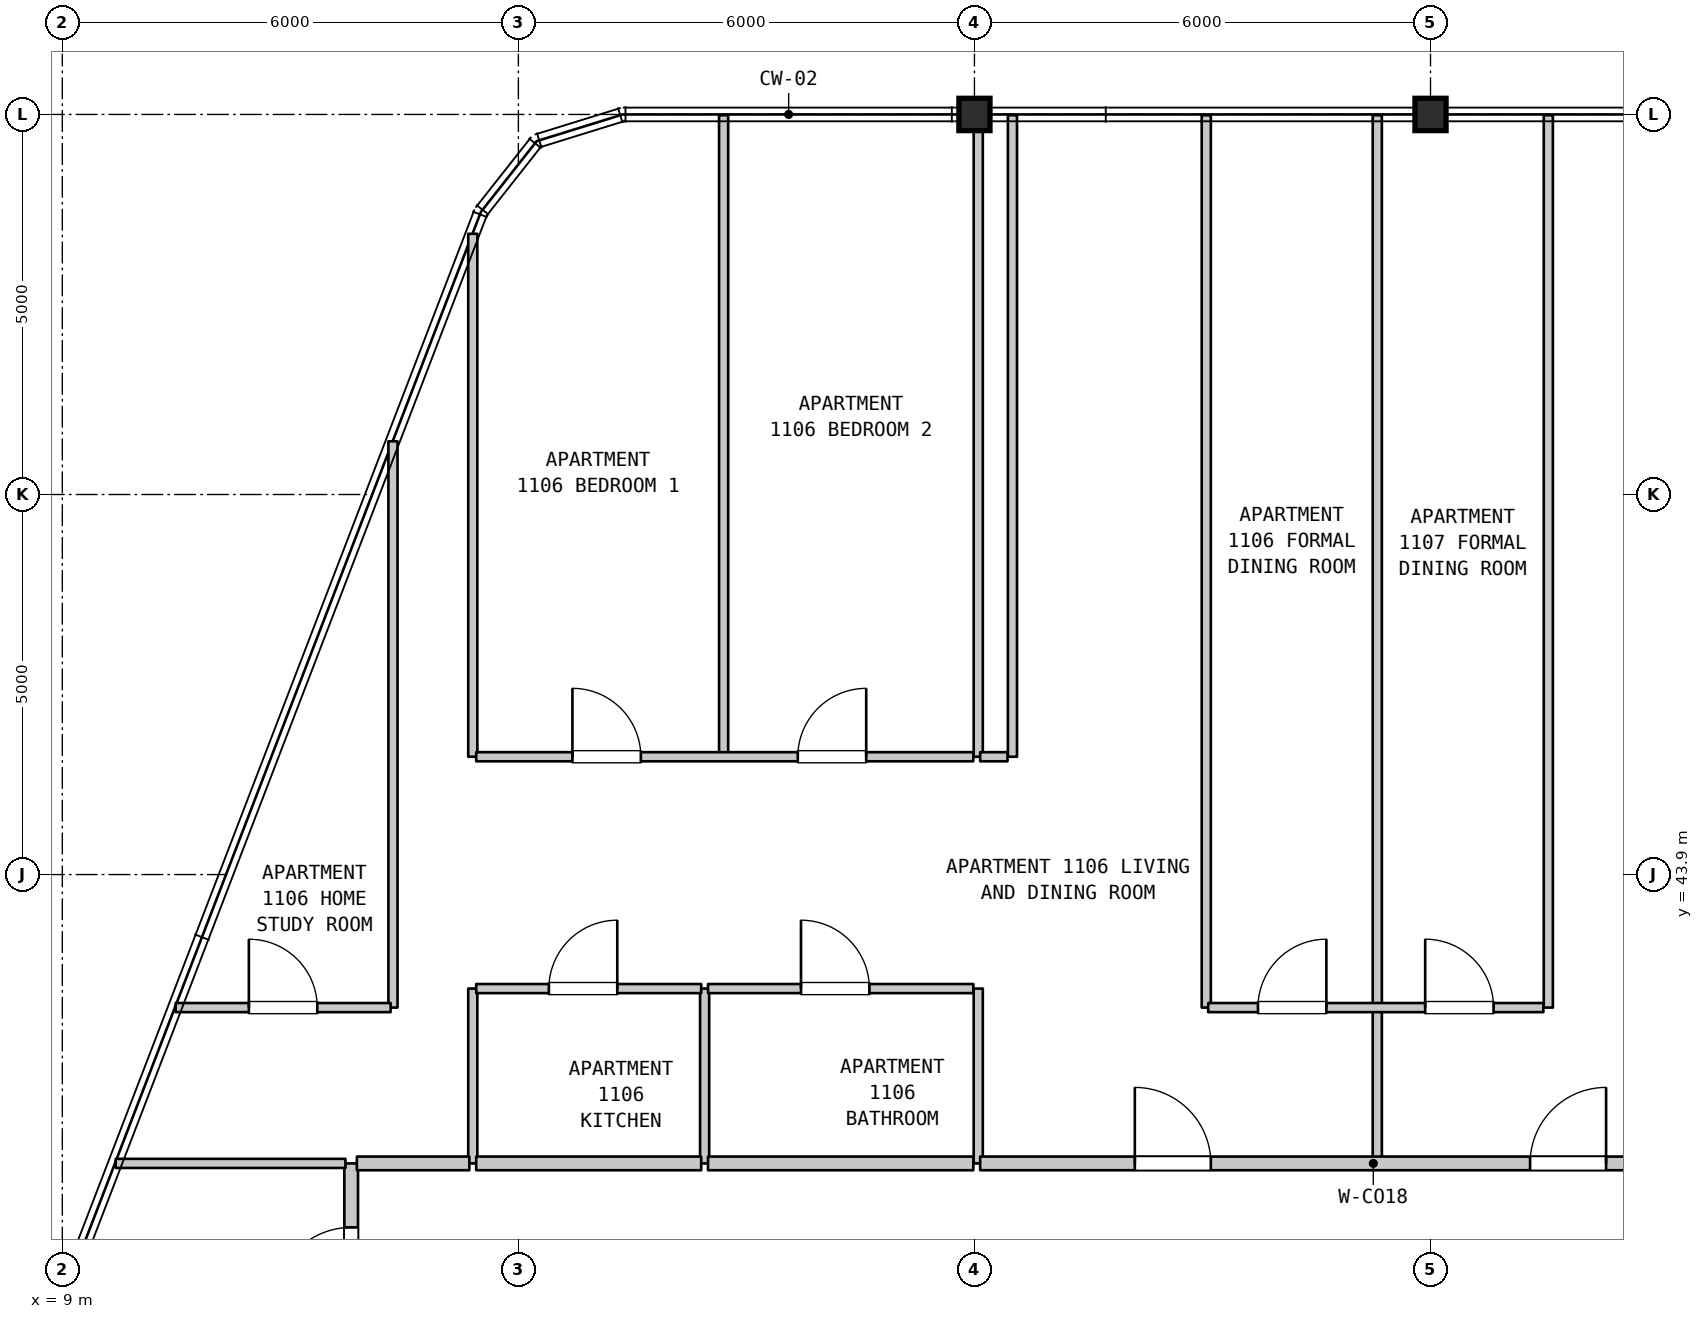
"""IFC4 building model, lengths in metres.
Left out: names, types, materials, properties, quantities, classifications, styles, units other than length and angle.
Written with IfcOpenShell. Run it as: python <this file> out.ifc"""

import sys

from ifc_helpers import new_model, si_unit, direction, frame, frame_2d, origin, origin_2d, place, context, subcontext, project, spatial, rectangle, i_section, extrude, element, fill, save


model = new_model("IFC4")
c1 = context("Model", 3, precision=1e-05, world=origin(), true_north=direction((0.0, 1.0)))
c2 = subcontext(c1, "Body", "Model", "MODEL_VIEW")
j1 = project(units=[si_unit("LENGTHUNIT", "METRE"), si_unit("PLANEANGLEUNIT", "RADIAN")], contexts=[c1])
p1 = place(None, origin())
s1 = spatial("IfcSite", under=j1, at=p1, CompositionType="ELEMENT")
p2 = place(p1, origin())
s2 = spatial("IfcBuilding", under=s1, at=p2, CompositionType="ELEMENT")
p3 = place(p2, frame((0.0, 0.0, 49.9)))
s3 = spatial("IfcBuildingStorey", under=s2, at=p3, CompositionType="ELEMENT", Elevation=49.9)
for number, where, z_axis, x_axis in (
    (1, (21.0, 53.9, 0.0), (0.0, 0.0, 1.0), (1.0, 0.0, 0.0)),
    (2, (27.0, 53.9, 0.0), (0.0, 0.0, 1.0), (1.0, 0.0, 0.0)),
):
    element("IfcColumn", number, at=place(p3, frame(where, z_axis=z_axis, x_axis=x_axis)), inside=s3, PredefinedType="COLUMN", context=c2, shape_type="SweptSolid", body=[
        extrude(i_section(OverallWidth=0.409, OverallDepth=0.425, WebThickness=0.032, FlangeThickness=0.052, FilletRadius=0.015, at=origin_2d()), origin(), (0.0, 0.0, 1.0), 3.7),
    ])
p4 = place(p3, frame((12.8, 37.416, 0.0), z_axis=(0.0, 0.0, 1.0), x_axis=(0.0, 1.0, 0.0)))
e3 = element("IfcWall", 3, at=p4, inside=s3, PredefinedType="STANDARD", context=c2, shape_type="SweptSolid", body=[
    extrude(rectangle(XDim=2.684, YDim=0.18, at=frame_2d((1.342, 0.0))), origin(), (0.0, 0.0, 1.0), 3.385),
])
p5 = place(p4, frame((0.842, 0.0, 0.0)))
e4 = element("IfcOpeningElement", 4, at=p5, cuts=e3, PredefinedType="OPENING", context=c2, shape_type="SweptSolid", body=[
    extrude(rectangle(XDim=1.0, YDim=2.15, at=frame_2d((0.5, 1.075))), frame((0.0, 0.1, 0.0), z_axis=(0.0, -1.0, 0.0), x_axis=(1.0, 0.0, 0.0)), (0.0, 0.0, 1.0), 0.2),
])
p6 = place(p3, frame((13.35, 42.15, 0.0), z_axis=(0.0, 0.0, 1.0), x_axis=(0.0, 1.0, 0.0)))
e5 = element("IfcWall", 5, at=p6, inside=s3, PredefinedType="PARTITIONING", context=c2, shape_type="SweptSolid", body=[
    extrude(rectangle(XDim=7.45, YDim=0.12, at=frame_2d((3.725, 0.0))), origin(), (0.0, 0.0, 1.0), 3.385),
])
p7 = place(p3, frame((14.4, 40.1, 0.0), z_axis=(0.0, 0.0, 1.0), x_axis=(0.0, 1.0, 0.0)))
e6 = element("IfcWall", 6, at=p7, inside=s3, PredefinedType="PARTITIONING", context=c2, shape_type="SweptSolid", body=[
    extrude(rectangle(XDim=2.3, YDim=0.12, at=frame_2d((1.15, 0.0))), origin(), (0.0, 0.0, 1.0), 3.385),
])
p8 = place(p3, frame((14.4, 45.45, 0.0), z_axis=(0.0, 0.0, 1.0), x_axis=(0.0, 1.0, 0.0)))
e7 = element("IfcWall", 7, at=p8, inside=s3, PredefinedType="PARTITIONING", context=c2, shape_type="SweptSolid", body=[
    extrude(rectangle(XDim=6.88, YDim=0.12, at=frame_2d((3.44, 0.0))), origin(), (0.0, 0.0, 1.0), 3.385),
])
p9 = place(p3, frame((17.45, 40.1, 0.0), z_axis=(0.0, 0.0, 1.0), x_axis=(0.0, 1.0, 0.0)))
e8 = element("IfcWall", 8, at=p9, inside=s3, PredefinedType="PARTITIONING", context=c2, shape_type="SweptSolid", body=[
    extrude(rectangle(XDim=2.3, YDim=0.12, at=frame_2d((1.15, 0.0))), origin(), (0.0, 0.0, 1.0), 3.385),
])
p10 = place(p3, frame((17.7, 45.45, 0.0), z_axis=(0.0, 0.0, 1.0), x_axis=(0.0, 1.0, 0.0)))
e9 = element("IfcWall", 9, at=p10, inside=s3, PredefinedType="PARTITIONING", context=c2, shape_type="SweptSolid", body=[
    extrude(rectangle(XDim=8.44, YDim=0.12, at=frame_2d((4.22, 0.0))), origin(), (0.0, 0.0, 1.0), 3.385),
])
p11 = place(p3, frame((21.05, 40.1, 0.0), z_axis=(0.0, 0.0, 1.0), x_axis=(0.0, 1.0, 0.0)))
e10 = element("IfcWall", 10, at=p11, inside=s3, PredefinedType="PARTITIONING", context=c2, shape_type="SweptSolid", body=[
    extrude(rectangle(XDim=2.3, YDim=0.12, at=frame_2d((1.15, 0.0))), origin(), (0.0, 0.0, 1.0), 3.025),
])
p12 = place(p3, frame((21.05, 45.45, 0.0), z_axis=(0.0, 0.0, 1.0), x_axis=(0.0, 1.0, 0.0)))
e11 = element("IfcWall", 11, at=p12, inside=s3, PredefinedType="PARTITIONING", context=c2, shape_type="SweptSolid", body=[
    extrude(rectangle(XDim=8.44, YDim=0.12, at=frame_2d((4.22, 0.0))), origin(), (0.0, 0.0, 1.0), 3.025),
])
p13 = place(p3, frame((21.5, 45.45, 0.0), z_axis=(0.0, 0.0, 1.0), x_axis=(0.0, 1.0, 0.0)))
e12 = element("IfcWall", 12, at=p13, inside=s3, PredefinedType="PARTITIONING", context=c2, shape_type="SweptSolid", body=[
    extrude(rectangle(XDim=8.44, YDim=0.12, at=frame_2d((4.22, 0.0))), origin(), (0.0, 0.0, 1.0), 3.385),
])
p14 = place(p3, frame((24.05, 42.15, 0.0), z_axis=(0.0, 0.0, 1.0), x_axis=(0.0, 1.0, 0.0)))
e13 = element("IfcWall", 13, at=p14, inside=s3, PredefinedType="PARTITIONING", context=c2, shape_type="SweptSolid", body=[
    extrude(rectangle(XDim=11.74, YDim=0.12, at=frame_2d((5.87, 0.0))), origin(), (0.0, 0.0, 1.0), 3.385),
])
p15 = place(p3, frame((26.3, 40.1, 0.0), z_axis=(0.0, 0.0, 1.0), x_axis=(0.0, 1.0, 0.0)))
e14 = element("IfcWall", 14, at=p15, inside=s3, PredefinedType="PARTITIONING", context=c2, shape_type="SweptSolid", body=[
    extrude(rectangle(XDim=2.05, YDim=0.12, at=frame_2d((1.025, 0.0))), origin(), (0.0, 0.0, 1.0), 3.385),
])
for number, where, z_axis, x_axis in (
    (15, (26.3, 42.15, 0.0), (0.0, 0.0, 1.0), (0.0, 1.0, 0.0)),
    (16, (28.55, 42.15, 0.0), (0.0, 0.0, 1.0), (0.0, 1.0, 0.0)),
):
    element("IfcWall", number, at=place(p3, frame(where, z_axis=z_axis, x_axis=x_axis)), inside=s3, PredefinedType="PARTITIONING", context=c2, shape_type="SweptSolid", body=[
        extrude(rectangle(XDim=11.74, YDim=0.12, at=frame_2d((5.87, 0.0))), origin(), (0.0, 0.0, 1.0), 3.385),
    ])
p16 = place(p3, frame((9.702, 40.1, 0.0), z_axis=(0.0, 0.0, 1.0), x_axis=(1.0, 0.0, 0.0)))
e17 = element("IfcWall", 17, at=p16, inside=s3, PredefinedType="PARTITIONING", context=c2, shape_type="SweptSolid", body=[
    extrude(rectangle(XDim=3.023, YDim=0.12, at=frame_2d((1.512, 0.0))), origin(), (0.0, 0.0, 1.0), 3.385),
])
p17 = place(p3, frame((12.875, 40.1, 0.0), z_axis=(0.0, 0.0, 1.0), x_axis=(1.0, 0.0, 0.0)))
e18 = element("IfcWall", 18, at=p17, inside=s3, PredefinedType="STANDARD", context=c2, shape_type="SweptSolid", body=[
    extrude(rectangle(XDim=1.48, YDim=0.18, at=frame_2d((0.74, 0.0))), origin(), (0.0, 0.0, 1.0), 3.385),
])
p18 = place(p3, frame((14.445, 40.1, 0.0), z_axis=(0.0, 0.0, 1.0), x_axis=(1.0, 0.0, 0.0)))
e19 = element("IfcWall", 19, at=p18, inside=s3, PredefinedType="STANDARD", context=c2, shape_type="SweptSolid", body=[
    extrude(rectangle(XDim=2.96, YDim=0.18, at=frame_2d((1.48, 0.0))), origin(), (0.0, 0.0, 1.0), 3.385),
])
p19 = place(p3, frame((17.495, 40.1, 0.0), z_axis=(0.0, 0.0, 1.0), x_axis=(1.0, 0.0, 0.0)))
e20 = element("IfcWall", 20, at=p19, inside=s3, PredefinedType="STANDARD", context=c2, shape_type="SweptSolid", body=[
    extrude(rectangle(XDim=3.49, YDim=0.18, at=frame_2d((1.745, 0.0))), origin(), (0.0, 0.0, 1.0), 3.385),
])
p20 = place(p3, frame((21.075, 40.1, 0.0), z_axis=(0.0, 0.0, 1.0), x_axis=(1.0, 0.0, 0.0)))
e21 = element("IfcWall", 21, at=p20, inside=s3, PredefinedType="STANDARD", context=c2, shape_type="SweptSolid", body=[
    extrude(rectangle(XDim=10.345, YDim=0.18, at=frame_2d((5.172, 0.0))), origin(), (0.0, 0.0, 1.0), 3.385),
])
p21 = place(p20, frame((2.035, 0.0, 0.0)))
e22 = element("IfcOpeningElement", 22, at=p21, cuts=e21, PredefinedType="OPENING", context=c2, shape_type="SweptSolid", body=[
    extrude(rectangle(XDim=1.0, YDim=2.15, at=frame_2d((0.5, 1.075))), frame((0.0, 0.1, 0.0), z_axis=(0.0, -1.0, 0.0), x_axis=(1.0, 0.0, 0.0)), (0.0, 0.0, 1.0), 0.2),
])
p22 = place(p20, frame((7.235, 0.0, 0.0)))
e23 = element("IfcOpeningElement", 23, at=p22, cuts=e21, PredefinedType="OPENING", context=c2, shape_type="SweptSolid", body=[
    extrude(rectangle(XDim=1.0, YDim=2.15, at=frame_2d((0.5, 1.075))), frame((0.0, 0.1, 0.0), z_axis=(0.0, -1.0, 0.0), x_axis=(1.0, 0.0, 0.0)), (0.0, 0.0, 1.0), 0.2),
])
p23 = place(p3, frame((10.491, 42.15, 0.0), z_axis=(0.0, 0.0, 1.0), x_axis=(1.0, 0.0, 0.0)))
e24 = element("IfcWall", 24, at=p23, inside=s3, PredefinedType="PARTITIONING", context=c2, shape_type="SweptSolid", body=[
    extrude(rectangle(XDim=2.828, YDim=0.12, at=frame_2d((1.414, 0.0))), origin(), (0.0, 0.0, 1.0), 3.385),
])
p24 = place(p23, frame((0.963, 0.0, 0.0)))
e25 = element("IfcOpeningElement", 25, at=p24, cuts=e24, PredefinedType="OPENING", context=c2, shape_type="SweptSolid", body=[
    extrude(rectangle(XDim=0.9, YDim=2.15, at=frame_2d((0.45, 1.075))), frame((0.0, 0.07, 0.0), z_axis=(0.0, -1.0, 0.0), x_axis=(1.0, 0.0, 0.0)), (0.0, 0.0, 1.0), 0.14),
])
p25 = place(p3, frame((24.075, 42.15, 0.0), z_axis=(0.0, 0.0, 1.0), x_axis=(1.0, 0.0, 0.0)))
e26 = element("IfcWall", 26, at=p25, inside=s3, PredefinedType="PARTITIONING", context=c2, shape_type="SweptSolid", body=[
    extrude(rectangle(XDim=4.41, YDim=0.12, at=frame_2d((2.205, 0.0))), origin(), (0.0, 0.0, 1.0), 3.385),
])
p26 = place(p25, frame((0.655, 0.0, 0.0)))
e27 = element("IfcOpeningElement", 27, at=p26, cuts=e26, PredefinedType="OPENING", context=c2, shape_type="SweptSolid", body=[
    extrude(rectangle(XDim=0.9, YDim=2.15, at=frame_2d((0.45, 1.075))), frame((0.0, 0.07, 0.0), z_axis=(0.0, -1.0, 0.0), x_axis=(1.0, 0.0, 0.0)), (0.0, 0.0, 1.0), 0.14),
])
p27 = place(p25, frame((2.855, 0.0, 0.0)))
e28 = element("IfcOpeningElement", 28, at=p27, cuts=e26, PredefinedType="OPENING", context=c2, shape_type="SweptSolid", body=[
    extrude(rectangle(XDim=0.9, YDim=2.15, at=frame_2d((0.45, 1.075))), frame((0.0, 0.07, 0.0), z_axis=(0.0, -1.0, 0.0), x_axis=(1.0, 0.0, 0.0)), (0.0, 0.0, 1.0), 0.14),
])
p28 = place(p3, frame((14.445, 42.4, 0.0), z_axis=(0.0, 0.0, 1.0), x_axis=(1.0, 0.0, 0.0)))
e29 = element("IfcWall", 29, at=p28, inside=s3, PredefinedType="PARTITIONING", context=c2, shape_type="SweptSolid", body=[
    extrude(rectangle(XDim=2.96, YDim=0.12, at=frame_2d((1.48, 0.0))), origin(), (0.0, 0.0, 1.0), 3.385),
])
p29 = place(p28, frame((0.956, 0.0, 0.0)))
e30 = element("IfcOpeningElement", 30, at=p29, cuts=e29, PredefinedType="OPENING", context=c2, shape_type="SweptSolid", body=[
    extrude(rectangle(XDim=0.9, YDim=2.15, at=frame_2d((0.45, 1.075))), frame((0.0, 0.07, 0.0), z_axis=(0.0, -1.0, 0.0), x_axis=(1.0, 0.0, 0.0)), (0.0, 0.0, 1.0), 0.14),
])
p30 = place(p3, frame((17.495, 42.4, 0.0), z_axis=(0.0, 0.0, 1.0), x_axis=(1.0, 0.0, 0.0)))
e31 = element("IfcWall", 31, at=p30, inside=s3, PredefinedType="PARTITIONING", context=c2, shape_type="SweptSolid", body=[
    extrude(rectangle(XDim=3.49, YDim=0.12, at=frame_2d((1.745, 0.0))), origin(), (0.0, 0.0, 1.0), 3.385),
])
p31 = place(p30, frame((1.223, 0.0, 0.0)))
e32 = element("IfcOpeningElement", 32, at=p31, cuts=e31, PredefinedType="OPENING", context=c2, shape_type="SweptSolid", body=[
    extrude(rectangle(XDim=0.9, YDim=2.1, at=frame_2d((0.45, 1.05))), frame((0.0, 0.07, 0.0), z_axis=(0.0, -1.0, 0.0), x_axis=(1.0, 0.0, 0.0)), (0.0, 0.0, 1.0), 0.14),
])
p32 = place(p3, frame((14.445, 45.45, 0.0), z_axis=(0.0, 0.0, 1.0), x_axis=(1.0, 0.0, 0.0)))
e33 = element("IfcWall", 33, at=p32, inside=s3, PredefinedType="PARTITIONING", context=c2, shape_type="SweptSolid", body=[
    extrude(rectangle(XDim=6.54, YDim=0.12, at=frame_2d((3.27, 0.0))), origin(), (0.0, 0.0, 1.0), 3.385),
])
p33 = place(p32, frame((1.266, 0.0, 0.0)))
e34 = element("IfcOpeningElement", 34, at=p33, cuts=e33, PredefinedType="OPENING", context=c2, shape_type="SweptSolid", body=[
    extrude(rectangle(XDim=0.9, YDim=2.15, at=frame_2d((0.45, 1.075))), frame((0.0, 0.07, 0.0), z_axis=(0.0, -1.0, 0.0), x_axis=(1.0, 0.0, 0.0)), (0.0, 0.0, 1.0), 0.14),
])
p34 = place(p32, frame((4.231, 0.0, 0.0)))
e35 = element("IfcOpeningElement", 35, at=p34, cuts=e33, PredefinedType="OPENING", context=c2, shape_type="SweptSolid", body=[
    extrude(rectangle(XDim=0.9, YDim=2.15, at=frame_2d((0.45, 1.075))), frame((0.0, 0.07, 0.0), z_axis=(0.0, -1.0, 0.0), x_axis=(1.0, 0.0, 0.0)), (0.0, 0.0, 1.0), 0.14),
])
p35 = place(p3, frame((21.075, 45.45, 0.0), z_axis=(0.0, 0.0, 1.0), x_axis=(1.0, 0.0, 0.0)))
e36 = element("IfcWall", 36, at=p35, inside=s3, PredefinedType="PARTITIONING", context=c2, shape_type="SweptSolid", body=[
    extrude(rectangle(XDim=0.36, YDim=0.12, at=frame_2d((0.18, 0.0))), origin(), (0.0, 0.0, 1.0), 3.385),
])
p36 = place(p5, origin())
e37 = element("IfcDoor", 37, at=p36, inside=s3, OperationType="SINGLE_SWING_LEFT", PredefinedType="DOOR", context=c2, shape_type="SweptSolid", body=[
    extrude(rectangle(XDim=1.0, YDim=2.15, at=frame_2d((0.5, 1.075))), frame((0.0, 0.025, 0.0), z_axis=(0.0, -1.0, 0.0), x_axis=(1.0, 0.0, 0.0)), (0.0, 0.0, 1.0), 0.05),
])
fill(e4, e37)
p37 = place(p21, origin())
e38 = element("IfcDoor", 38, at=p37, inside=s3, OperationType="SINGLE_SWING_LEFT", PredefinedType="DOOR", context=c2, shape_type="SweptSolid", body=[
    extrude(rectangle(XDim=1.0, YDim=2.15, at=frame_2d((0.5, 1.075))), frame((0.0, 0.025, 0.0), z_axis=(0.0, -1.0, 0.0), x_axis=(1.0, 0.0, 0.0)), (0.0, 0.0, 1.0), 0.05),
])
fill(e22, e38)
p38 = place(p22, origin())
e39 = element("IfcDoor", 39, at=p38, inside=s3, OperationType="SINGLE_SWING_RIGHT", PredefinedType="DOOR", context=c2, shape_type="SweptSolid", body=[
    extrude(rectangle(XDim=1.0, YDim=2.15, at=frame_2d((0.5, 1.075))), frame((0.0, 0.025, 0.0), z_axis=(0.0, -1.0, 0.0), x_axis=(1.0, 0.0, 0.0)), (0.0, 0.0, 1.0), 0.05),
])
fill(e23, e39)
p39 = place(p24, origin())
e40 = element("IfcDoor", 40, at=p39, inside=s3, OperationType="SINGLE_SWING_LEFT", PredefinedType="DOOR", context=c2, shape_type="SweptSolid", body=[
    extrude(rectangle(XDim=0.9, YDim=2.15, at=frame_2d((0.45, 1.075))), frame((0.0, 0.025, 0.0), z_axis=(0.0, -1.0, 0.0), x_axis=(1.0, 0.0, 0.0)), (0.0, 0.0, 1.0), 0.05),
])
fill(e25, e40)
p40 = place(p26, origin())
e41 = element("IfcDoor", 41, at=p40, inside=s3, OperationType="SINGLE_SWING_RIGHT", PredefinedType="DOOR", context=c2, shape_type="SweptSolid", body=[
    extrude(rectangle(XDim=0.9, YDim=2.15, at=frame_2d((0.45, 1.075))), frame((0.0, 0.025, 0.0), z_axis=(0.0, -1.0, 0.0), x_axis=(1.0, 0.0, 0.0)), (0.0, 0.0, 1.0), 0.05),
])
fill(e27, e41)
p41 = place(p27, origin())
e42 = element("IfcDoor", 42, at=p41, inside=s3, OperationType="SINGLE_SWING_LEFT", PredefinedType="DOOR", context=c2, shape_type="SweptSolid", body=[
    extrude(rectangle(XDim=0.9, YDim=2.15, at=frame_2d((0.45, 1.075))), frame((0.0, 0.025, 0.0), z_axis=(0.0, -1.0, 0.0), x_axis=(1.0, 0.0, 0.0)), (0.0, 0.0, 1.0), 0.05),
])
fill(e28, e42)
p42 = place(p29, origin())
e43 = element("IfcDoor", 43, at=p42, inside=s3, OperationType="SINGLE_SWING_RIGHT", PredefinedType="DOOR", context=c2, shape_type="SweptSolid", body=[
    extrude(rectangle(XDim=0.9, YDim=2.15, at=frame_2d((0.45, 1.075))), frame((0.0, 0.025, 0.0), z_axis=(0.0, -1.0, 0.0), x_axis=(1.0, 0.0, 0.0)), (0.0, 0.0, 1.0), 0.05),
])
fill(e30, e43)
p43 = place(p31, origin())
e44 = element("IfcDoor", 44, at=p43, inside=s3, OperationType="SINGLE_SWING_LEFT", PredefinedType="DOOR", context=c2, shape_type="SweptSolid", body=[
    extrude(rectangle(XDim=0.9, YDim=2.1, at=frame_2d((0.45, 1.05))), frame((0.0, 0.025, 0.0), z_axis=(0.0, -1.0, 0.0), x_axis=(1.0, 0.0, 0.0)), (0.0, 0.0, 1.0), 0.05),
])
fill(e32, e44)
p44 = place(p33, origin())
e45 = element("IfcDoor", 45, at=p44, inside=s3, OperationType="SINGLE_SWING_LEFT", PredefinedType="DOOR", context=c2, shape_type="SweptSolid", body=[
    extrude(rectangle(XDim=0.9, YDim=2.15, at=frame_2d((0.45, 1.075))), frame((0.0, 0.025, 0.0), z_axis=(0.0, -1.0, 0.0), x_axis=(1.0, 0.0, 0.0)), (0.0, 0.0, 1.0), 0.05),
])
fill(e34, e45)
p45 = place(p34, origin())
e46 = element("IfcDoor", 46, at=p45, inside=s3, OperationType="SINGLE_SWING_RIGHT", PredefinedType="DOOR", context=c2, shape_type="SweptSolid", body=[
    extrude(rectangle(XDim=0.9, YDim=2.15, at=frame_2d((0.45, 1.075))), frame((0.0, 0.025, 0.0), z_axis=(0.0, -1.0, 0.0), x_axis=(1.0, 0.0, 0.0)), (0.0, 0.0, 1.0), 0.05),
])
fill(e35, e46)
save(model, sys.argv[1])
